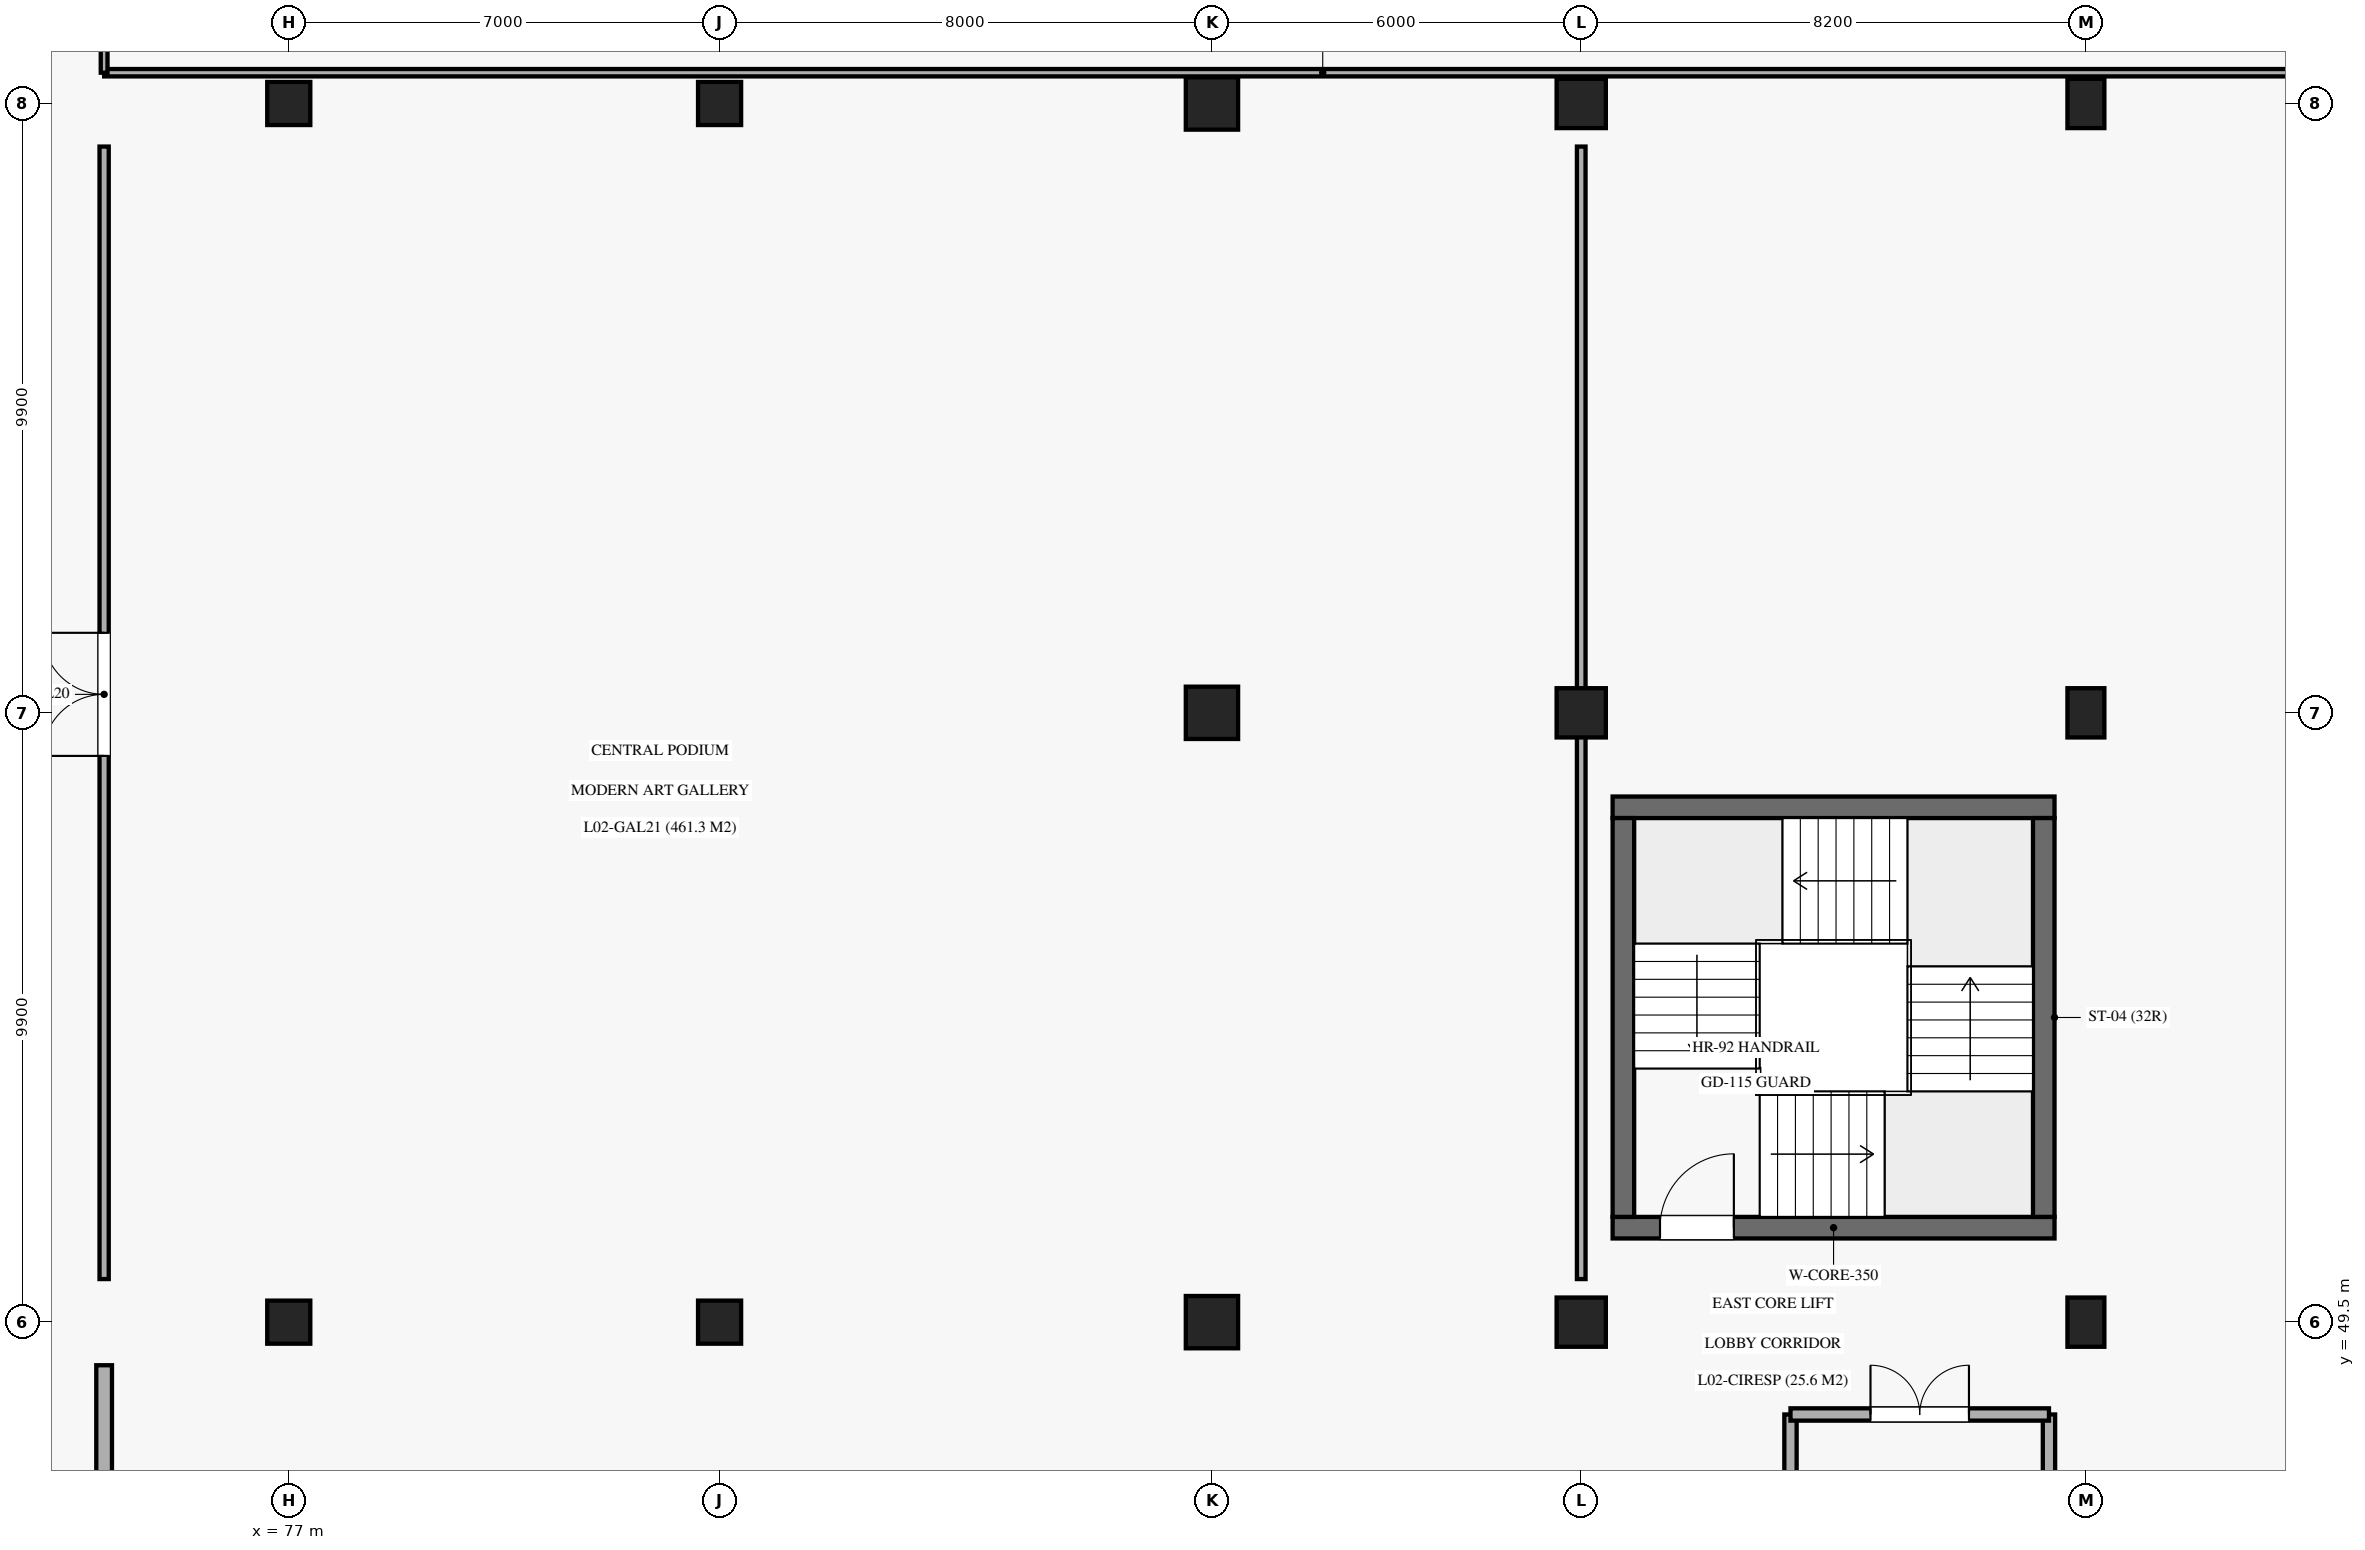
"""IFC4 building model, lengths in metres.
Left out: names, types, materials, properties, quantities, classifications, styles, units other than length and angle.
Written with IfcOpenShell. Run it as: python <this file> out.ifc"""

import sys

from ifc_helpers import new_model, si_unit, direction, frame, frame_2d, origin, origin_2d, place, context, subcontext, project, spatial, rectangle, extrude, element, fill, save


model = new_model("IFC4")
c1 = context("Model", 3, precision=1e-05, world=origin(), true_north=direction((0.0, 1.0)))
c2 = subcontext(c1, "Body", "Model", "MODEL_VIEW")
j1 = project(units=[si_unit("LENGTHUNIT", "METRE"), si_unit("PLANEANGLEUNIT", "RADIAN")], contexts=[c1])
p1 = place(None, origin())
s1 = spatial("IfcSite", under=j1, at=p1, CompositionType="ELEMENT")
p2 = place(p1, origin())
s2 = spatial("IfcBuilding", under=s1, at=p2, CompositionType="ELEMENT")
p3 = place(p2, frame((0.0, 0.0, 10.88)))
s3 = spatial("IfcBuildingStorey", under=s2, at=p3, CompositionType="ELEMENT", Elevation=10.88)
for number, where, z_axis, x_axis in (
    (1, (77.0, 49.5, 0.0), (0.0, 0.0, 1.0), (1.0, 0.0, 0.0)),
    (2, (77.0, 69.3, 0.0), (0.0, 0.0, 1.0), (1.0, 0.0, 0.0)),
    (3, (84.0, 49.5, 0.0), (0.0, 0.0, 1.0), (1.0, 0.0, 0.0)),
    (4, (84.0, 69.3, 0.0), (0.0, 0.0, 1.0), (1.0, 0.0, 0.0)),
):
    element("IfcColumn", number, at=place(p3, frame(where, z_axis=z_axis, x_axis=x_axis)), inside=s3, PredefinedType="COLUMN", context=c2, shape_type="SweptSolid", body=[
        extrude(rectangle(XDim=0.7, YDim=0.7, at=origin_2d()), origin(), (0.0, 0.0, 1.0), 5.44),
    ])
for number, where, z_axis, x_axis in (
    (5, (92.0, 49.5, 0.0), (0.0, 0.0, 1.0), (1.0, 0.0, 0.0)),
    (6, (92.0, 59.4, 0.0), (0.0, 0.0, 1.0), (1.0, 0.0, 0.0)),
    (7, (92.0, 69.3, 0.0), (0.0, 0.0, 1.0), (1.0, 0.0, 0.0)),
):
    element("IfcColumn", number, at=place(p3, frame(where, z_axis=z_axis, x_axis=x_axis)), inside=s3, PredefinedType="COLUMN", context=c2, shape_type="SweptSolid", body=[
        extrude(rectangle(XDim=0.85, YDim=0.85, at=origin_2d()), origin(), (0.0, 0.0, 1.0), 5.44),
    ])
for number, where, z_axis, x_axis in (
    (8, (98.0, 49.5, 0.0), (0.0, 0.0, 1.0), (1.0, 0.0, 0.0)),
    (9, (98.0, 59.4, 0.0), (0.0, 0.0, 1.0), (1.0, 0.0, 0.0)),
    (10, (98.0, 69.3, 0.0), (0.0, 0.0, 1.0), (1.0, 0.0, 0.0)),
):
    element("IfcColumn", number, at=place(p3, frame(where, z_axis=z_axis, x_axis=x_axis)), inside=s3, PredefinedType="COLUMN", context=c2, shape_type="SweptSolid", body=[
        extrude(rectangle(XDim=0.8, YDim=0.8, at=origin_2d()), origin(), (0.0, 0.0, 1.0), 5.44),
    ])
for number, where, z_axis, x_axis in (
    (11, (106.2, 49.5, 0.0), (0.0, 0.0, 1.0), (1.0, 0.0, 0.0)),
    (12, (106.2, 59.4, 0.0), (0.0, 0.0, 1.0), (1.0, 0.0, 0.0)),
    (13, (106.2, 69.3, 0.0), (0.0, 0.0, 1.0), (1.0, 0.0, 0.0)),
):
    element("IfcColumn", number, at=place(p3, frame(where, z_axis=z_axis, x_axis=x_axis)), inside=s3, PredefinedType="COLUMN", context=c2, shape_type="SweptSolid", body=[
        extrude(rectangle(XDim=0.6, YDim=0.8, at=origin_2d()), origin(), (0.0, 0.0, 1.0), 5.44),
    ])
p4 = place(p3, frame((98.51, 51.035, 0.0), z_axis=(0.0, 0.0, 1.0), x_axis=(1.0, 0.0, 0.0)))
e14 = element("IfcWall", 14, at=p4, inside=s3, PredefinedType="SHEAR", context=c2, shape_type="SweptSolid", body=[
    extrude(rectangle(XDim=7.18, YDim=0.35, at=frame_2d((3.59, 0.0))), origin(), (0.0, 0.0, 1.0), 5.16),
])
p5 = place(p4, frame((0.77, 0.0, 0.0)))
e15 = element("IfcOpeningElement", 15, at=p5, cuts=e14, PredefinedType="OPENING", context=c2, shape_type="SweptSolid", body=[
    extrude(rectangle(XDim=1.2, YDim=2.2, at=frame_2d((0.6, 1.1))), frame((0.0, 0.185, 0.0), z_axis=(0.0, -1.0, 0.0), x_axis=(1.0, 0.0, 0.0)), (0.0, 0.0, 1.0), 0.37),
])
p6 = place(p3, frame((98.51, 57.865, 0.0), z_axis=(0.0, 0.0, 1.0), x_axis=(1.0, 0.0, 0.0)))
e16 = element("IfcWall", 16, at=p6, inside=s3, PredefinedType="SHEAR", context=c2, shape_type="SweptSolid", body=[
    extrude(rectangle(XDim=7.18, YDim=0.35, at=frame_2d((3.59, 0.0))), origin(), (0.0, 0.0, 1.0), 5.16),
])
for number, where, z_axis, x_axis in (
    (17, (98.685, 51.21, 0.0), (0.0, 0.0, 1.0), (0.0, 1.0, 0.0)),
    (18, (105.515, 51.21, 0.0), (0.0, 0.0, 1.0), (0.0, 1.0, 0.0)),
):
    element("IfcWall", number, at=place(p3, frame(where, z_axis=z_axis, x_axis=x_axis)), inside=s3, PredefinedType="SHEAR", context=c2, shape_type="SweptSolid", body=[
        extrude(rectangle(XDim=6.48, YDim=0.35, at=frame_2d((3.24, 0.0))), origin(), (0.0, 0.0, 1.0), 5.16),
    ])
p7 = place(p3, frame((101.4, 45.6, 0.0), z_axis=(0.0, 0.0, 1.0), x_axis=(0.0, 1.0, 0.0)))
e19 = element("IfcWall", 19, at=p7, inside=s3, PredefinedType="SOLIDWALL", context=c2, shape_type="SweptSolid", body=[
    extrude(rectangle(XDim=2.4, YDim=0.2, at=frame_2d((1.2, 0.0))), origin(), (0.0, 0.0, 1.0), 4.28),
])
p8 = place(p3, frame((105.6, 40.3, 0.0), z_axis=(0.0, 0.0, 1.0), x_axis=(0.0, 1.0, 0.0)))
e20 = element("IfcWall", 20, at=p8, inside=s3, PredefinedType="SOLIDWALL", context=c2, shape_type="SweptSolid", body=[
    extrude(rectangle(XDim=7.7, YDim=0.2, at=frame_2d((3.85, 0.0))), origin(), (0.0, 0.0, 1.0), 4.28),
])
p9 = place(p3, frame((101.4, 48.0, 0.0), z_axis=(0.0, 0.0, 1.0), x_axis=(1.0, 0.0, 0.0)))
e21 = element("IfcWall", 21, at=p9, inside=s3, PredefinedType="SOLIDWALL", context=c2, shape_type="SweptSolid", body=[
    extrude(rectangle(XDim=4.2, YDim=0.2, at=frame_2d((2.1, 0.0))), origin(), (0.0, 0.0, 1.0), 4.28),
])
p10 = place(p9, frame((1.3, 0.0, 0.0)))
e22 = element("IfcOpeningElement", 22, at=p10, cuts=e21, PredefinedType="OPENING", context=c2, shape_type="SweptSolid", body=[
    extrude(rectangle(XDim=1.6, YDim=2.2, at=frame_2d((0.8, 1.1))), frame((0.0, 0.11, 0.0), z_axis=(0.0, -1.0, 0.0), x_axis=(1.0, 0.0, 0.0)), (0.0, 0.0, 1.0), 0.22),
])
p11 = place(p3, frame((74.0, 50.2, 0.0), z_axis=(0.0, 0.0, 1.0), x_axis=(0.0, 1.0, 0.0)))
e23 = element("IfcWall", 23, at=p11, inside=s3, PredefinedType="PARTITIONING", context=c2, shape_type="SweptSolid", body=[
    extrude(rectangle(XDim=18.4, YDim=0.15, at=frame_2d((9.2, 0.0))), origin(), (0.0, 0.0, 1.0), 4.28),
])
p12 = place(p11, frame((8.5, 0.0, 0.0)))
e24 = element("IfcOpeningElement", 24, at=p12, cuts=e23, PredefinedType="OPENING", context=c2, shape_type="SweptSolid", body=[
    extrude(rectangle(XDim=2.0, YDim=2.5, at=frame_2d((1.0, 1.25))), frame((0.0, 0.085, 0.0), z_axis=(0.0, -1.0, 0.0), x_axis=(1.0, 0.0, 0.0)), (0.0, 0.0, 1.0), 0.17),
])
p13 = place(p3, frame((98.0, 50.2, 0.0), z_axis=(0.0, 0.0, 1.0), x_axis=(0.0, 1.0, 0.0)))
e25 = element("IfcWall", 25, at=p13, inside=s3, PredefinedType="PARTITIONING", context=c2, shape_type="SweptSolid", body=[
    extrude(rectangle(XDim=18.4, YDim=0.14, at=frame_2d((9.2, 0.0))), origin(), (0.0, 0.0, 1.0), 4.28),
])
p14 = place(p3, frame((74.0, 30.2, 0.0), z_axis=(0.0, 0.0, 1.0), x_axis=(0.0, 1.0, 0.0)))
e26 = element("IfcWall", 26, at=p14, inside=s3, PredefinedType="SOLIDWALL", context=c2, shape_type="SweptSolid", body=[
    extrude(rectangle(XDim=18.6, YDim=0.255, at=frame_2d((9.3, 0.0))), origin(), (0.0, 0.0, 1.0), 4.28),
])
p15 = place(p14, frame((7.0, 0.0, 0.0)))
e27 = element("IfcOpeningElement", 27, at=p15, cuts=e26, PredefinedType="OPENING", context=c2, shape_type="SweptSolid", body=[
    extrude(rectangle(XDim=1.8, YDim=2.35, at=frame_2d((0.9, 1.175))), frame((0.0, 0.137, 0.0), z_axis=(0.0, -1.0, 0.0), x_axis=(1.0, 0.0, 0.0)), (0.0, 0.0, 1.0), 0.275),
])
p16 = place(p3, frame((74.0, 69.8, 0.0), z_axis=(0.0, 0.0, 1.0), x_axis=(1.0, 0.0, 0.0)))
e28 = element("IfcWall", 28, at=p16, inside=s3, PredefinedType="PARTITIONING", context=c2, shape_type="SweptSolid", body=[
    extrude(rectangle(XDim=39.6, YDim=0.12, at=frame_2d((19.8, 0.0))), origin(), (0.0, 0.0, 1.0), 4.28),
])
p17 = place(p3, frame((74.0, 69.8, 0.0), z_axis=(0.0, 0.0, 1.0), x_axis=(0.0, 1.0, 0.0)))
e29 = element("IfcWall", 29, at=p17, inside=s3, PredefinedType="PARTITIONING", context=c2, shape_type="SweptSolid", body=[
    extrude(rectangle(XDim=18.8, YDim=0.11, at=frame_2d((9.4, 0.0))), origin(), (0.0, 0.0, 1.0), 4.28),
])
p18 = place(p17, frame((8.0, 0.0, 0.0)))
e30 = element("IfcOpeningElement", 30, at=p18, cuts=e29, PredefinedType="OPENING", context=c2, shape_type="SweptSolid", body=[
    extrude(rectangle(XDim=1.6, YDim=2.25, at=frame_2d((0.8, 1.125))), frame((0.0, 0.065, 0.0), z_axis=(0.0, -1.0, 0.0), x_axis=(1.0, 0.0, 0.0)), (0.0, 0.0, 1.0), 0.13),
])
p19 = place(p5, origin())
e31 = element("IfcDoor", 31, at=p19, inside=s3, OperationType="SINGLE_SWING_RIGHT", PredefinedType="DOOR", context=c2, shape_type="SweptSolid", body=[
    extrude(rectangle(XDim=1.2, YDim=2.2, at=frame_2d((0.6, 1.1))), frame((0.0, 0.025, 0.0), z_axis=(0.0, -1.0, 0.0), x_axis=(1.0, 0.0, 0.0)), (0.0, 0.0, 1.0), 0.05),
])
fill(e15, e31)
p20 = place(p10, origin())
e32 = element("IfcDoor", 32, at=p20, inside=s3, OperationType="DOUBLE_DOOR_SINGLE_SWING", PredefinedType="DOOR", context=c2, shape_type="SweptSolid", body=[
    extrude(rectangle(XDim=1.6, YDim=2.2, at=frame_2d((0.8, 1.1))), frame((0.0, 0.025, 0.0), z_axis=(0.0, -1.0, 0.0), x_axis=(1.0, 0.0, 0.0)), (0.0, 0.0, 1.0), 0.05),
])
fill(e22, e32)
p21 = place(p12, origin())
e33 = element("IfcDoor", 33, at=p21, inside=s3, OperationType="DOUBLE_DOOR_SINGLE_SWING", PredefinedType="DOOR", context=c2, shape_type="SweptSolid", body=[
    extrude(rectangle(XDim=2.0, YDim=2.5, at=frame_2d((1.0, 1.25))), frame((0.0, 0.025, 0.0), z_axis=(0.0, -1.0, 0.0), x_axis=(1.0, 0.0, 0.0)), (0.0, 0.0, 1.0), 0.05),
])
fill(e24, e33)
save(model, sys.argv[1])
